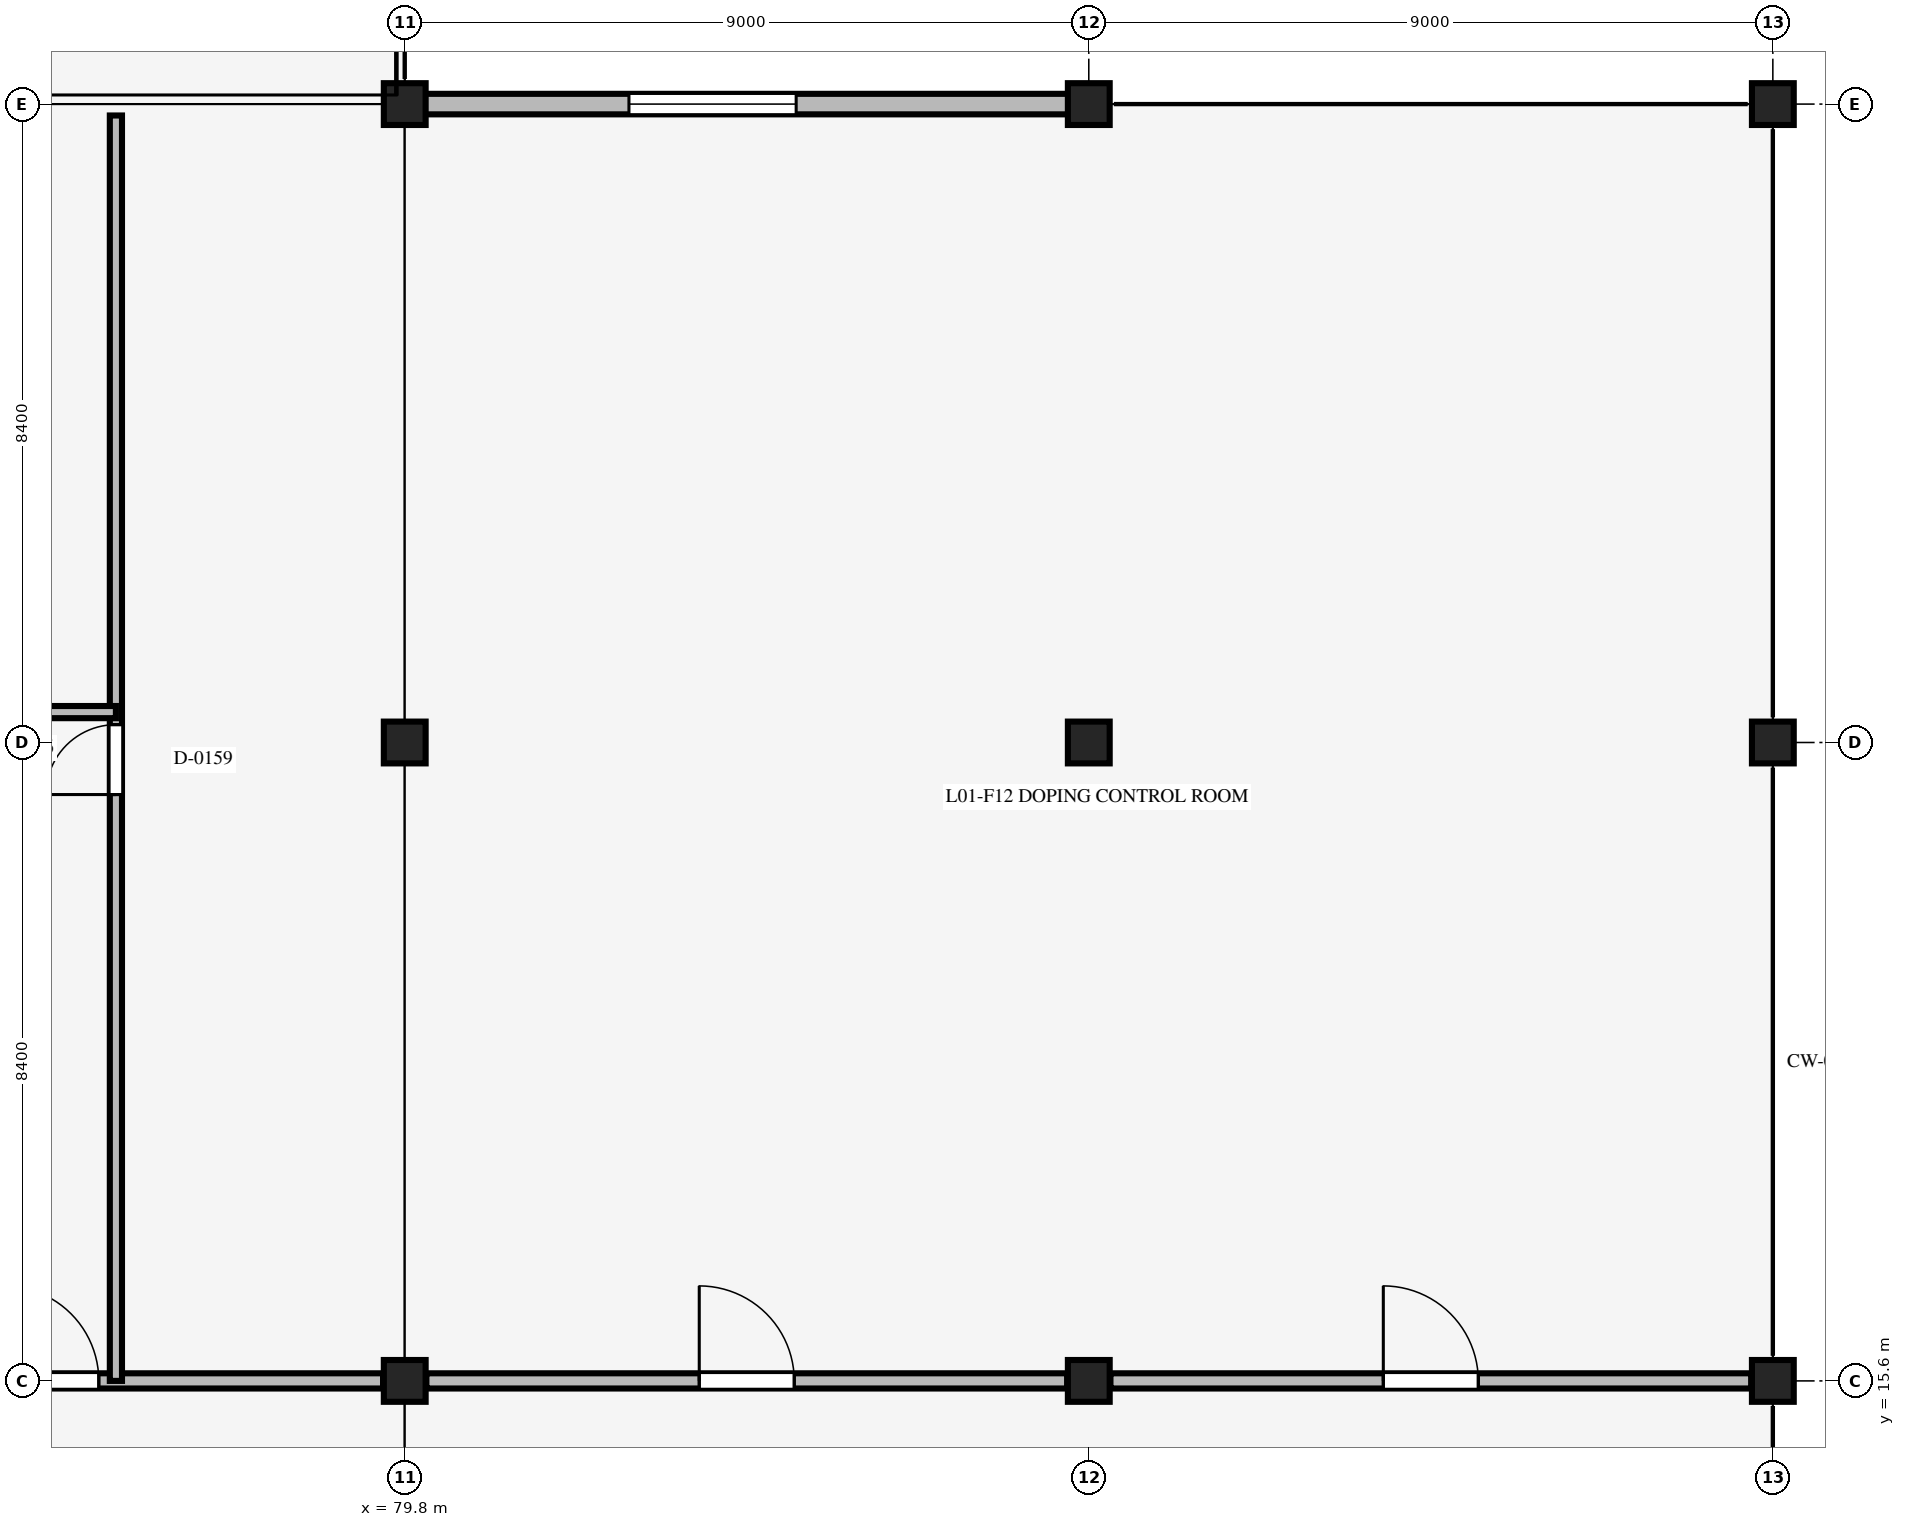
"""IFC4 building model, lengths in metres.
Left out: names, types, materials, properties, quantities, classifications, styles, units other than length and angle.
Written with IfcOpenShell. Run it as: python <this file> out.ifc"""

import sys

from ifc_helpers import new_model, si_unit, direction, frame, frame_2d, origin, origin_2d, place, context, subcontext, project, spatial, rectangle, extrude, element, fill, save


model = new_model("IFC4")
c1 = context("Model", 3, precision=1e-05, world=origin(), true_north=direction((0.0, 1.0)))
c2 = subcontext(c1, "Body", "Model", "MODEL_VIEW")
j1 = project(units=[si_unit("LENGTHUNIT", "METRE"), si_unit("PLANEANGLEUNIT", "RADIAN")], contexts=[c1])
p1 = place(None, origin())
s1 = spatial("IfcSite", under=j1, at=p1, CompositionType="ELEMENT")
p2 = place(p1, origin())
s2 = spatial("IfcBuilding", under=s1, at=p2, CompositionType="ELEMENT")
p3 = place(p2, frame((0.0, 0.0, 6.0)))
s3 = spatial("IfcBuildingStorey", under=s2, at=p3, CompositionType="ELEMENT", Elevation=6.0)
for number, where, z_axis, x_axis in (
    (1, (79.8, 32.4, 0.0), (0.0, 0.0, 1.0), (1.0, 0.0, 0.0)),
    (2, (79.8, 15.6, 0.0), (0.0, 0.0, 1.0), (1.0, 0.0, 0.0)),
    (3, (79.8, 24.0, 0.0), (0.0, 0.0, 1.0), (1.0, 0.0, 0.0)),
    (4, (88.8, 15.6, 0.0), (0.0, 0.0, 1.0), (1.0, 0.0, 0.0)),
    (5, (88.8, 24.0, 0.0), (0.0, 0.0, 1.0), (1.0, 0.0, 0.0)),
    (6, (88.8, 32.4, 0.0), (0.0, 0.0, 1.0), (1.0, 0.0, 0.0)),
    (7, (97.8, 15.6, 0.0), (0.0, 0.0, 1.0), (1.0, 0.0, 0.0)),
    (8, (97.8, 24.0, 0.0), (0.0, 0.0, 1.0), (1.0, 0.0, 0.0)),
    (9, (97.8, 32.4, 0.0), (0.0, 0.0, 1.0), (1.0, 0.0, 0.0)),
):
    element("IfcColumn", number, at=place(p3, frame(where, z_axis=z_axis, x_axis=x_axis)), inside=s3, PredefinedType="COLUMN", context=c2, shape_type="SweptSolid", body=[
        extrude(rectangle(XDim=0.55, YDim=0.55, at=origin_2d()), origin(), (0.0, 0.0, 1.0), 6.0),
    ])
p4 = place(p3, frame((80.065, 32.4, 0.0), z_axis=(0.0, 0.0, 1.0), x_axis=(1.0, 0.0, 0.0)))
e10 = element("IfcWall", 10, at=p4, inside=s3, PredefinedType="STANDARD", context=c2, shape_type="SweptSolid", body=[
    extrude(rectangle(XDim=8.47, YDim=0.27, at=frame_2d((4.235, 0.0))), origin(), (0.0, 0.0, 1.0), 5.371),
])
p5 = place(p4, frame((2.685, 0.0, 0.95)))
e11 = element("IfcOpeningElement", 11, at=p5, cuts=e10, PredefinedType="OPENING", context=c2, shape_type="SweptSolid", body=[
    extrude(rectangle(XDim=2.2, YDim=1.9, at=frame_2d((1.1, 0.95))), frame((0.0, 0.145, 0.0), z_axis=(0.0, -1.0, 0.0), x_axis=(1.0, 0.0, 0.0)), (0.0, 0.0, 1.0), 0.29),
])
p6 = place(p3, frame((71.685, 15.6, 0.0), z_axis=(0.0, 0.0, 1.0), x_axis=(1.0, 0.0, 0.0)))
e12 = element("IfcWall", 12, at=p6, inside=s3, PredefinedType="STANDARD", context=c2, shape_type="SweptSolid", body=[
    extrude(rectangle(XDim=7.83, YDim=0.2, at=frame_2d((3.915, 0.0))), origin(), (0.0, 0.0, 1.0), 3.15),
])
p7 = place(p6, frame((2.84, 0.0, 0.0)))
e13 = element("IfcOpeningElement", 13, at=p7, cuts=e12, PredefinedType="OPENING", context=c2, shape_type="SweptSolid", body=[
    extrude(rectangle(XDim=1.25, YDim=2.2, at=frame_2d((0.625, 1.1))), frame((0.0, 0.11, 0.0), z_axis=(0.0, -1.0, 0.0), x_axis=(1.0, 0.0, 0.0)), (0.0, 0.0, 1.0), 0.22),
])
p8 = place(p3, frame((80.085, 15.6, 0.0), z_axis=(0.0, 0.0, 1.0), x_axis=(1.0, 0.0, 0.0)))
e14 = element("IfcWall", 14, at=p8, inside=s3, PredefinedType="STANDARD", context=c2, shape_type="SweptSolid", body=[
    extrude(rectangle(XDim=8.43, YDim=0.2, at=frame_2d((4.215, 0.0))), origin(), (0.0, 0.0, 1.0), 3.15),
])
p9 = place(p8, frame((3.59, 0.0, 0.0)))
e15 = element("IfcOpeningElement", 15, at=p9, cuts=e14, PredefinedType="OPENING", context=c2, shape_type="SweptSolid", body=[
    extrude(rectangle(XDim=1.25, YDim=2.2, at=frame_2d((0.625, 1.1))), frame((0.0, 0.11, 0.0), z_axis=(0.0, -1.0, 0.0), x_axis=(1.0, 0.0, 0.0)), (0.0, 0.0, 1.0), 0.22),
])
p10 = place(p3, frame((89.085, 15.6, 0.0), z_axis=(0.0, 0.0, 1.0), x_axis=(1.0, 0.0, 0.0)))
e16 = element("IfcWall", 16, at=p10, inside=s3, PredefinedType="STANDARD", context=c2, shape_type="SweptSolid", body=[
    extrude(rectangle(XDim=8.43, YDim=0.2, at=frame_2d((4.215, 0.0))), origin(), (0.0, 0.0, 1.0), 3.15),
])
p11 = place(p10, frame((3.59, 0.0, 0.0)))
e17 = element("IfcOpeningElement", 17, at=p11, cuts=e16, PredefinedType="OPENING", context=c2, shape_type="SweptSolid", body=[
    extrude(rectangle(XDim=1.25, YDim=2.2, at=frame_2d((0.625, 1.1))), frame((0.0, 0.11, 0.0), z_axis=(0.0, -1.0, 0.0), x_axis=(1.0, 0.0, 0.0)), (0.0, 0.0, 1.0), 0.22),
])
p12 = place(p3, frame((76.0, 15.6, 0.0), z_axis=(0.0, 0.0, 1.0), x_axis=(0.0, 1.0, 0.0)))
e18 = element("IfcWall", 18, at=p12, inside=s3, PredefinedType="STANDARD", context=c2, shape_type="SweptSolid", body=[
    extrude(rectangle(XDim=16.65, YDim=0.16, at=frame_2d((8.325, 0.0))), origin(), (0.0, 0.0, 1.0), 3.15),
])
p13 = place(p12, frame((7.715, 0.0, 0.0)))
e19 = element("IfcOpeningElement", 19, at=p13, cuts=e18, PredefinedType="OPENING", context=c2, shape_type="SweptSolid", body=[
    extrude(rectangle(XDim=0.92, YDim=2.15, at=frame_2d((0.46, 1.075))), frame((0.0, 0.09, 0.0), z_axis=(0.0, -1.0, 0.0), x_axis=(1.0, 0.0, 0.0)), (0.0, 0.0, 1.0), 0.18),
])
p14 = place(p3, frame((54.085, 24.4, 0.0), z_axis=(0.0, 0.0, 1.0), x_axis=(1.0, 0.0, 0.0)))
e20 = element("IfcWall", 20, at=p14, inside=s3, PredefinedType="STANDARD", context=c2, shape_type="SweptSolid", body=[
    extrude(rectangle(XDim=21.915, YDim=0.16, at=frame_2d((10.958, 0.0))), origin(), (0.0, 0.0, 1.0), 3.15),
])
p15 = place(p14, frame((11.04, 0.0, 0.0)))
e21 = element("IfcOpeningElement", 21, at=p15, cuts=e20, PredefinedType="OPENING", context=c2, shape_type="SweptSolid", body=[
    extrude(rectangle(XDim=1.35, YDim=2.2, at=frame_2d((0.675, 1.1))), frame((0.0, 0.09, 0.0), z_axis=(0.0, -1.0, 0.0), x_axis=(1.0, 0.0, 0.0)), (0.0, 0.0, 1.0), 0.18),
])
p16 = place(p5, origin())
e22 = element("IfcWindow", 22, at=p16, inside=s3, PartitioningType="SINGLE_PANEL", PredefinedType="WINDOW", context=c2, shape_type="SweptSolid", body=[
    extrude(rectangle(XDim=2.2, YDim=1.9, at=frame_2d((1.1, 0.95))), frame((0.0, 0.03, 0.0), z_axis=(0.0, -1.0, 0.0), x_axis=(1.0, 0.0, 0.0)), (0.0, 0.0, 1.0), 0.06),
])
fill(e11, e22)
p17 = place(p7, origin())
e23 = element("IfcDoor", 23, at=p17, inside=s3, OperationType="SINGLE_SWING_LEFT", PredefinedType="DOOR", context=c2, shape_type="SweptSolid", body=[
    extrude(rectangle(XDim=1.25, YDim=2.2, at=frame_2d((0.625, 1.1))), frame((0.0, 0.025, 0.0), z_axis=(0.0, -1.0, 0.0), x_axis=(1.0, 0.0, 0.0)), (0.0, 0.0, 1.0), 0.05),
])
fill(e13, e23)
p18 = place(p9, origin())
e24 = element("IfcDoor", 24, at=p18, inside=s3, OperationType="SINGLE_SWING_LEFT", PredefinedType="DOOR", context=c2, shape_type="SweptSolid", body=[
    extrude(rectangle(XDim=1.25, YDim=2.2, at=frame_2d((0.625, 1.1))), frame((0.0, 0.025, 0.0), z_axis=(0.0, -1.0, 0.0), x_axis=(1.0, 0.0, 0.0)), (0.0, 0.0, 1.0), 0.05),
])
fill(e15, e24)
p19 = place(p11, origin())
e25 = element("IfcDoor", 25, at=p19, inside=s3, OperationType="SINGLE_SWING_LEFT", PredefinedType="DOOR", context=c2, shape_type="SweptSolid", body=[
    extrude(rectangle(XDim=1.25, YDim=2.2, at=frame_2d((0.625, 1.1))), frame((0.0, 0.025, 0.0), z_axis=(0.0, -1.0, 0.0), x_axis=(1.0, 0.0, 0.0)), (0.0, 0.0, 1.0), 0.05),
])
fill(e17, e25)
p20 = place(p13, origin())
e26 = element("IfcDoor", 26, at=p20, inside=s3, OperationType="SINGLE_SWING_LEFT", PredefinedType="DOOR", context=c2, shape_type="SweptSolid", body=[
    extrude(rectangle(XDim=0.92, YDim=2.15, at=frame_2d((0.46, 1.075))), frame((0.0, 0.025, 0.0), z_axis=(0.0, -1.0, 0.0), x_axis=(1.0, 0.0, 0.0)), (0.0, 0.0, 1.0), 0.05),
])
fill(e19, e26)
save(model, sys.argv[1])
